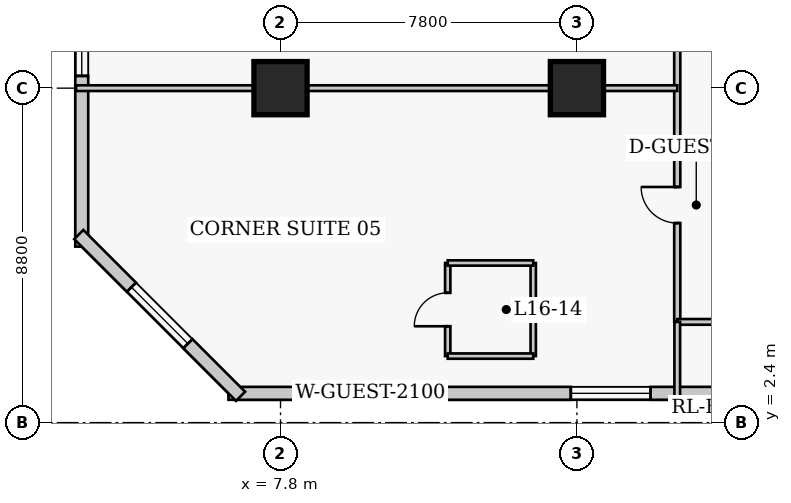
"""IFC4 building model, lengths in metres.
Left out: names, types, materials, properties, quantities, classifications, styles, units other than length and angle.
Written with IfcOpenShell. Run it as: python <this file> out.ifc"""

import sys

from ifc_helpers import new_model, si_unit, direction, frame, frame_2d, origin, origin_2d, place, context, subcontext, project, spatial, rectangle, extrude, element, fill, save


model = new_model("IFC4")
c1 = context("Model", 3, precision=1e-05, world=origin(), true_north=direction((0.0, 1.0)))
c2 = subcontext(c1, "Body", "Model", "MODEL_VIEW")
j1 = project(units=[si_unit("LENGTHUNIT", "METRE"), si_unit("PLANEANGLEUNIT", "RADIAN")], contexts=[c1])
p1 = place(None, origin())
s1 = spatial("IfcSite", under=j1, at=p1, CompositionType="ELEMENT")
p2 = place(p1, origin())
s2 = spatial("IfcBuilding", under=s1, at=p2, CompositionType="ELEMENT")
p3 = place(p2, frame((0.0, 0.0, 67.8)))
s3 = spatial("IfcBuildingStorey", under=s2, at=p3, CompositionType="ELEMENT", Elevation=67.8)
for number, where, z_axis, x_axis in (
    (1, (7.8, 11.2, 0.0), (0.0, 0.0, 1.0), (1.0, 0.0, 0.0)),
    (2, (15.6, 11.2, 0.0), (0.0, 0.0, 1.0), (1.0, 0.0, 0.0)),
):
    element("IfcColumn", number, at=place(p3, frame(where, z_axis=z_axis, x_axis=x_axis)), inside=s3, PredefinedType="COLUMN", context=c2, shape_type="SweptSolid", body=[
        extrude(rectangle(XDim=1.4, YDim=1.4, at=origin_2d()), origin(), (0.0, 0.0, 1.0), 3.8),
    ])
p4 = place(p3, frame((6.43, 3.17, 0.0), z_axis=(0.0, 0.0, 1.0), x_axis=(1.0, 0.0, 0.0)))
e3 = element("IfcWall", 3, at=p4, inside=s3, PredefinedType="SOLIDWALL", context=c2, shape_type="SweptSolid", body=[
    extrude(rectangle(XDim=29.89, YDim=0.34, at=frame_2d((14.945, 0.0))), origin(), (0.0, 0.0, 1.0), 3.54),
])
p5 = place(p4, frame((19.42, 0.0, 0.0)))
e4 = element("IfcOpeningElement", 4, at=p5, cuts=e3, PredefinedType="OPENING", context=c2, shape_type="SweptSolid", body=[
    extrude(rectangle(XDim=1.4, YDim=2.15, at=frame_2d((0.7, 1.075))), frame((0.0, 0.18, 0.0), z_axis=(0.0, -1.0, 0.0), x_axis=(1.0, 0.0, 0.0)), (0.0, 0.0, 1.0), 0.36),
])
p6 = place(p4, frame((2.686, 0.0, 0.85)))
e5 = element("IfcOpeningElement", 5, at=p6, cuts=e3, PredefinedType="OPENING", context=c2, shape_type="SweptSolid", body=[
    extrude(rectangle(XDim=2.1, YDim=1.85, at=frame_2d((1.05, 0.925))), frame((0.0, 0.18, 0.0), z_axis=(0.0, -1.0, 0.0), x_axis=(1.0, 0.0, 0.0)), (0.0, 0.0, 1.0), 0.36),
])
p7 = place(p4, frame((9.009, 0.0, 0.85)))
e6 = element("IfcOpeningElement", 6, at=p7, cuts=e3, PredefinedType="OPENING", context=c2, shape_type="SweptSolid", body=[
    extrude(rectangle(XDim=2.1, YDim=1.85, at=frame_2d((1.05, 0.925))), frame((0.0, 0.18, 0.0), z_axis=(0.0, -1.0, 0.0), x_axis=(1.0, 0.0, 0.0)), (0.0, 0.0, 1.0), 0.36),
])
p8 = place(p4, frame((25.104, 0.0, 0.85)))
e7 = element("IfcOpeningElement", 7, at=p8, cuts=e3, PredefinedType="OPENING", context=c2, shape_type="SweptSolid", body=[
    extrude(rectangle(XDim=2.1, YDim=1.85, at=frame_2d((1.05, 0.925))), frame((0.0, 0.18, 0.0), z_axis=(0.0, -1.0, 0.0), x_axis=(1.0, 0.0, 0.0)), (0.0, 0.0, 1.0), 0.36),
])
p9 = place(p3, frame((2.57, 42.17, 0.0), z_axis=(0.0, 0.0, 1.0), x_axis=(0.0, -1.0, 0.0)))
e8 = element("IfcWall", 8, at=p9, inside=s3, PredefinedType="SOLIDWALL", context=c2, shape_type="SweptSolid", body=[
    extrude(rectangle(XDim=35.14, YDim=0.34, at=frame_2d((17.57, 0.0))), origin(), (0.0, 0.0, 1.0), 3.54),
])
p10 = place(p9, frame((3.343, 0.0, 0.85)))
e9 = element("IfcOpeningElement", 9, at=p10, cuts=e8, PredefinedType="OPENING", context=c2, shape_type="SweptSolid", body=[
    extrude(rectangle(XDim=2.1, YDim=1.85, at=frame_2d((1.05, 0.925))), frame((0.0, 0.18, 0.0), z_axis=(0.0, -1.0, 0.0), x_axis=(1.0, 0.0, 0.0)), (0.0, 0.0, 1.0), 0.36),
])
p11 = place(p9, frame((10.978, 0.0, 0.85)))
e10 = element("IfcOpeningElement", 10, at=p11, cuts=e8, PredefinedType="OPENING", context=c2, shape_type="SweptSolid", body=[
    extrude(rectangle(XDim=2.1, YDim=1.85, at=frame_2d((1.05, 0.925))), frame((0.0, 0.18, 0.0), z_axis=(0.0, -1.0, 0.0), x_axis=(1.0, 0.0, 0.0)), (0.0, 0.0, 1.0), 0.36),
])
p12 = place(p9, frame((19.762, 0.0, 0.85)))
e11 = element("IfcOpeningElement", 11, at=p12, cuts=e8, PredefinedType="OPENING", context=c2, shape_type="SweptSolid", body=[
    extrude(rectangle(XDim=2.1, YDim=1.85, at=frame_2d((1.05, 0.925))), frame((0.0, 0.18, 0.0), z_axis=(0.0, -1.0, 0.0), x_axis=(1.0, 0.0, 0.0)), (0.0, 0.0, 1.0), 0.36),
])
p13 = place(p9, frame((28.548, 0.0, 0.85)))
e12 = element("IfcOpeningElement", 12, at=p13, cuts=e8, PredefinedType="OPENING", context=c2, shape_type="SweptSolid", body=[
    extrude(rectangle(XDim=2.1, YDim=1.85, at=frame_2d((1.05, 0.925))), frame((0.0, 0.18, 0.0), z_axis=(0.0, -1.0, 0.0), x_axis=(1.0, 0.0, 0.0)), (0.0, 0.0, 1.0), 0.36),
])
p14 = place(p3, frame((2.492, 7.348, 0.0), z_axis=(0.0, 0.0, 1.0), x_axis=(0.707106781187, -0.707106781187, 0.0)))
e13 = element("IfcWall", 13, at=p14, inside=s3, PredefinedType="SOLIDWALL", context=c2, shape_type="SweptSolid", body=[
    extrude(rectangle(XDim=6.02, YDim=0.34, at=frame_2d((3.01, 0.0))), origin(), (0.0, 0.0, 1.0), 3.54),
])
p15 = place(p14, frame((1.96, 0.0, 0.85)))
e14 = element("IfcOpeningElement", 14, at=p15, cuts=e13, PredefinedType="OPENING", context=c2, shape_type="SweptSolid", body=[
    extrude(rectangle(XDim=2.1, YDim=1.85, at=frame_2d((1.05, 0.925))), frame((0.0, 0.18, 0.0), z_axis=(0.0, -1.0, 0.0), x_axis=(1.0, 0.0, 0.0)), (0.0, 0.0, 1.0), 0.36),
])
p16 = place(p3, frame((18.24, 5.05, 0.0), z_axis=(0.0, 0.0, 1.0), x_axis=(0.0, 1.0, 0.0)))
e15 = element("IfcWall", 15, at=p16, inside=s3, PredefinedType="PARTITIONING", context=c2, shape_type="SweptSolid", body=[
    extrude(rectangle(XDim=35.6, YDim=0.16, at=frame_2d((17.8, 0.0))), origin(), (0.0, 0.0, 1.0), 3.54),
])
p17 = place(p16, frame((2.6, 0.0, 0.0)))
e16 = element("IfcOpeningElement", 16, at=p17, cuts=e15, PredefinedType="OPENING", context=c2, shape_type="SweptSolid", body=[
    extrude(rectangle(XDim=0.95, YDim=2.1, at=frame_2d((0.475, 1.05))), frame((0.0, 0.09, 0.0), z_axis=(0.0, -1.0, 0.0), x_axis=(1.0, 0.0, 0.0)), (0.0, 0.0, 1.0), 0.18),
])
p18 = place(p16, frame((10.075, 0.0, 0.0)))
e17 = element("IfcOpeningElement", 17, at=p18, cuts=e15, PredefinedType="OPENING", context=c2, shape_type="SweptSolid", body=[
    extrude(rectangle(XDim=0.95, YDim=2.1, at=frame_2d((0.475, 1.05))), frame((0.0, 0.09, 0.0), z_axis=(0.0, -1.0, 0.0), x_axis=(1.0, 0.0, 0.0)), (0.0, 0.0, 1.0), 0.18),
])
p19 = place(p16, frame((18.875, 0.0, 0.0)))
e18 = element("IfcOpeningElement", 18, at=p19, cuts=e15, PredefinedType="OPENING", context=c2, shape_type="SweptSolid", body=[
    extrude(rectangle(XDim=0.95, YDim=2.1, at=frame_2d((0.475, 1.05))), frame((0.0, 0.09, 0.0), z_axis=(0.0, -1.0, 0.0), x_axis=(1.0, 0.0, 0.0)), (0.0, 0.0, 1.0), 0.18),
])
p20 = place(p16, frame((26.575, 0.0, 0.0)))
e19 = element("IfcOpeningElement", 19, at=p20, cuts=e15, PredefinedType="OPENING", context=c2, shape_type="SweptSolid", body=[
    extrude(rectangle(XDim=0.95, YDim=2.1, at=frame_2d((0.475, 1.05))), frame((0.0, 0.09, 0.0), z_axis=(0.0, -1.0, 0.0), x_axis=(1.0, 0.0, 0.0)), (0.0, 0.0, 1.0), 0.18),
])
p21 = place(p16, frame((32.53, 0.0, 0.0)))
e20 = element("IfcOpeningElement", 20, at=p21, cuts=e15, PredefinedType="OPENING", context=c2, shape_type="SweptSolid", body=[
    extrude(rectangle(XDim=1.0, YDim=2.15, at=frame_2d((0.5, 1.075))), frame((0.0, 0.09, 0.0), z_axis=(0.0, -1.0, 0.0), x_axis=(1.0, 0.0, 0.0)), (0.0, 0.0, 1.0), 0.18),
])
p22 = place(p3, frame((18.24, 5.05, 0.0), z_axis=(0.0, 0.0, 1.0), x_axis=(1.0, 0.0, 0.0)))
e21 = element("IfcWall", 21, at=p22, inside=s3, PredefinedType="PARTITIONING", context=c2, shape_type="SweptSolid", body=[
    extrude(rectangle(XDim=2.22, YDim=0.15, at=frame_2d((1.11, 0.0))), origin(), (0.0, 0.0, 1.0), 3.54),
])
p23 = place(p3, frame((18.24, 3.02, 0.0), z_axis=(0.0, 0.0, 1.0), x_axis=(0.0, 1.0, 0.0)))
e22 = element("IfcWall", 22, at=p23, inside=s3, PredefinedType="PARTITIONING", context=c2, shape_type="SweptSolid", body=[
    extrude(rectangle(XDim=2.03, YDim=0.15, at=frame_2d((1.015, 0.0))), origin(), (0.0, 0.0, 1.0), 3.54),
])
p24 = place(p3, frame((12.2, 4.15, 0.0), z_axis=(0.0, 0.0, 1.0), x_axis=(0.0, 1.0, 0.0)))
e23 = element("IfcWall", 23, at=p24, inside=s3, PredefinedType="PLUMBINGWALL", context=c2, shape_type="SweptSolid", body=[
    extrude(rectangle(XDim=2.45, YDim=0.14, at=frame_2d((1.225, 0.0))), origin(), (0.0, 0.0, 1.0), 3.54),
])
p25 = place(p24, frame((0.785, 0.0, 0.0)))
e24 = element("IfcOpeningElement", 24, at=p25, cuts=e23, PredefinedType="OPENING", context=c2, shape_type="SweptSolid", body=[
    extrude(rectangle(XDim=0.88, YDim=2.05, at=frame_2d((0.44, 1.025))), frame((0.0, 0.08, 0.0), z_axis=(0.0, -1.0, 0.0), x_axis=(1.0, 0.0, 0.0)), (0.0, 0.0, 1.0), 0.16),
])
p26 = place(p3, frame((14.45, 4.15, 0.0), z_axis=(0.0, 0.0, 1.0), x_axis=(0.0, 1.0, 0.0)))
e25 = element("IfcWall", 25, at=p26, inside=s3, PredefinedType="PLUMBINGWALL", context=c2, shape_type="SweptSolid", body=[
    extrude(rectangle(XDim=2.45, YDim=0.14, at=frame_2d((1.225, 0.0))), origin(), (0.0, 0.0, 1.0), 3.54),
])
for number, where, z_axis, x_axis in (
    (26, (12.2, 4.15, 0.0), (0.0, 0.0, 1.0), (1.0, 0.0, 0.0)),
    (27, (12.2, 6.6, 0.0), (0.0, 0.0, 1.0), (1.0, 0.0, 0.0)),
):
    element("IfcWall", number, at=place(p3, frame(where, z_axis=z_axis, x_axis=x_axis)), inside=s3, PredefinedType="PLUMBINGWALL", context=c2, shape_type="SweptSolid", body=[
        extrude(rectangle(XDim=2.25, YDim=0.14, at=frame_2d((1.125, 0.0))), origin(), (0.0, 0.0, 1.0), 3.54),
    ])
p27 = place(p3, frame((2.42, 11.2, 0.0), z_axis=(0.0, 0.0, 1.0), x_axis=(1.0, 0.0, 0.0)))
e28 = element("IfcWall", 28, at=p27, inside=s3, PredefinedType="PARTITIONING", context=c2, shape_type="SweptSolid", body=[
    extrude(rectangle(XDim=15.82, YDim=0.15, at=frame_2d((7.91, 0.0))), origin(), (0.0, 0.0, 1.0), 2.593),
])
p28 = place(p6, origin())
e29 = element("IfcWindow", 29, at=p28, inside=s3, PartitioningType="SINGLE_PANEL", PredefinedType="WINDOW", context=c2, shape_type="SweptSolid", body=[
    extrude(rectangle(XDim=2.1, YDim=1.85, at=frame_2d((1.05, 0.925))), frame((0.0, 0.03, 0.0), z_axis=(0.0, -1.0, 0.0), x_axis=(1.0, 0.0, 0.0)), (0.0, 0.0, 1.0), 0.06),
])
fill(e5, e29)
p29 = place(p7, origin())
e30 = element("IfcWindow", 30, at=p29, inside=s3, PartitioningType="SINGLE_PANEL", PredefinedType="WINDOW", context=c2, shape_type="SweptSolid", body=[
    extrude(rectangle(XDim=2.1, YDim=1.85, at=frame_2d((1.05, 0.925))), frame((0.0, 0.03, 0.0), z_axis=(0.0, -1.0, 0.0), x_axis=(1.0, 0.0, 0.0)), (0.0, 0.0, 1.0), 0.06),
])
fill(e6, e30)
p30 = place(p13, origin())
e31 = element("IfcWindow", 31, at=p30, inside=s3, PartitioningType="SINGLE_PANEL", PredefinedType="WINDOW", context=c2, shape_type="SweptSolid", body=[
    extrude(rectangle(XDim=2.1, YDim=1.85, at=frame_2d((1.05, 0.925))), frame((0.0, 0.03, 0.0), z_axis=(0.0, -1.0, 0.0), x_axis=(1.0, 0.0, 0.0)), (0.0, 0.0, 1.0), 0.06),
])
fill(e12, e31)
p31 = place(p15, origin())
e32 = element("IfcWindow", 32, at=p31, inside=s3, PartitioningType="SINGLE_PANEL", PredefinedType="WINDOW", context=c2, shape_type="SweptSolid", body=[
    extrude(rectangle(XDim=2.1, YDim=1.85, at=frame_2d((1.05, 0.925))), frame((0.0, 0.03, 0.0), z_axis=(0.0, -1.0, 0.0), x_axis=(1.0, 0.0, 0.0)), (0.0, 0.0, 1.0), 0.06),
])
fill(e14, e32)
p32 = place(p25, origin())
e33 = element("IfcDoor", 33, at=p32, inside=s3, OperationType="SINGLE_SWING_LEFT", PredefinedType="DOOR", context=c2, shape_type="SweptSolid", body=[
    extrude(rectangle(XDim=0.88, YDim=2.05, at=frame_2d((0.44, 1.025))), frame((0.0, 0.025, 0.0), z_axis=(0.0, -1.0, 0.0), x_axis=(1.0, 0.0, 0.0)), (0.0, 0.0, 1.0), 0.05),
])
fill(e24, e33)
p33 = place(p17, origin())
e34 = element("IfcDoor", 34, at=p33, inside=s3, OperationType="SINGLE_SWING_RIGHT", PredefinedType="DOOR", context=c2, shape_type="SweptSolid", body=[
    extrude(rectangle(XDim=0.95, YDim=2.1, at=frame_2d((0.475, 1.05))), frame((0.0, 0.025, 0.0), z_axis=(0.0, -1.0, 0.0), x_axis=(1.0, 0.0, 0.0)), (0.0, 0.0, 1.0), 0.05),
])
fill(e16, e34)
save(model, sys.argv[1])
